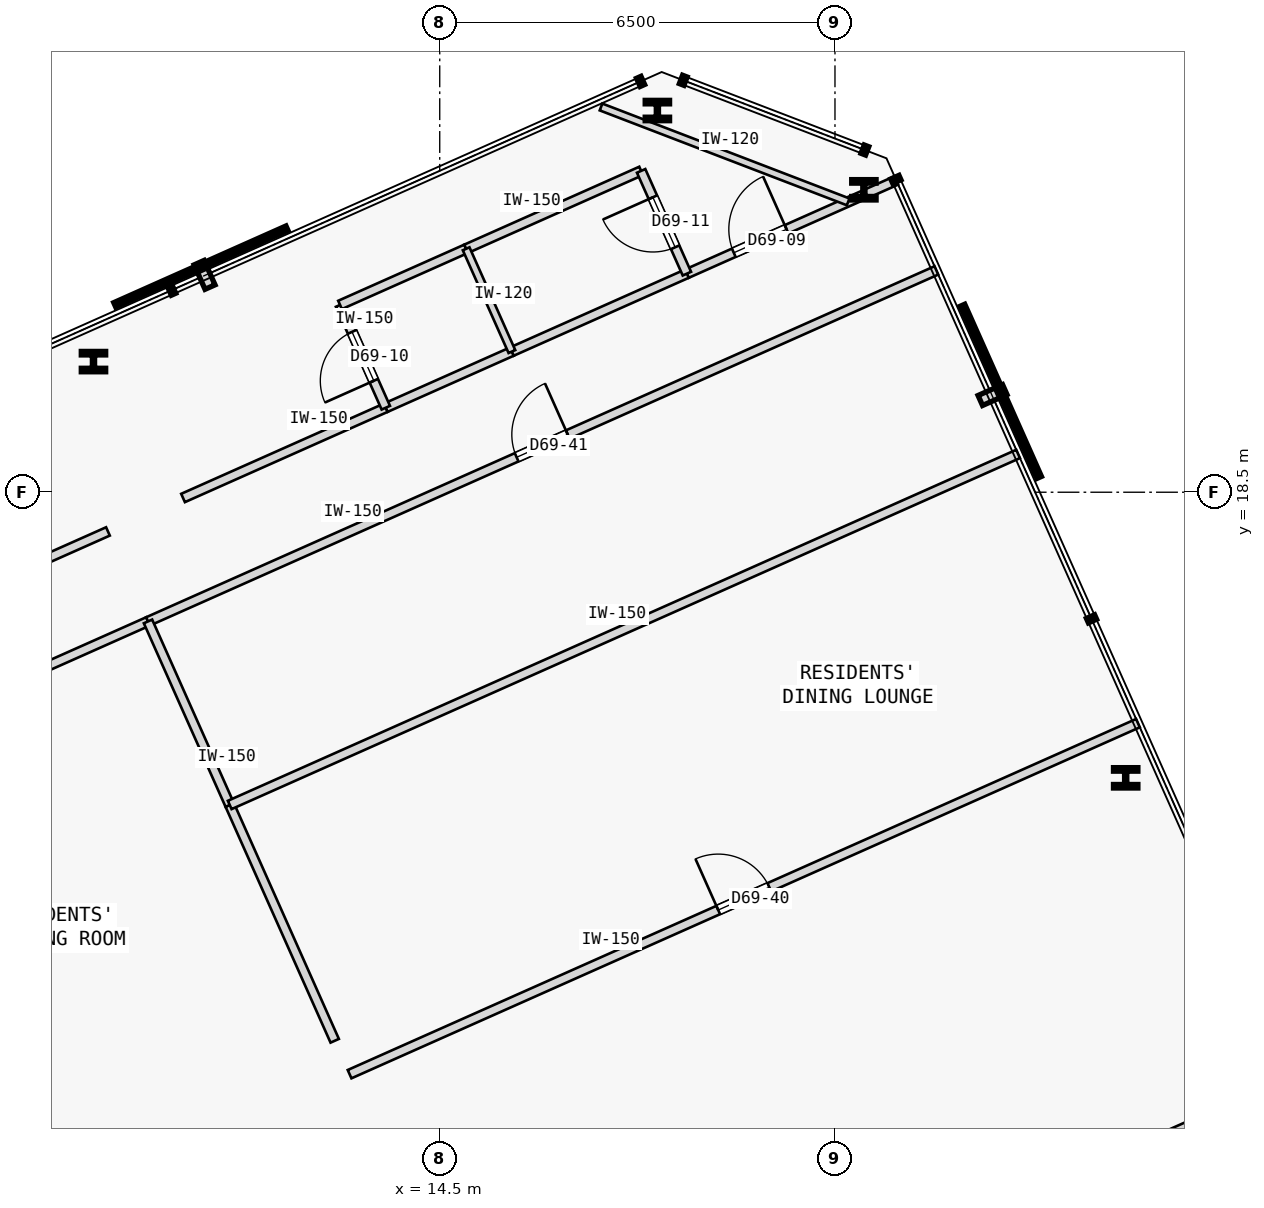
"""IFC4 building model, lengths in metres.
Left out: names, types, materials, properties, quantities, classifications, styles, units other than length and angle.
Written with IfcOpenShell. Run it as: python <this file> out.ifc"""

import sys

from ifc_helpers import new_model, si_unit, direction, frame, frame_2d, origin, origin_2d, place, context, subcontext, project, spatial, rectangle, i_section, extrude, element, fill, save


model = new_model("IFC4")
c1 = context("Model", 3, precision=1e-05, world=origin(), true_north=direction((0.0, 1.0)))
c2 = subcontext(c1, "Body", "Model", "MODEL_VIEW")
j1 = project(units=[si_unit("LENGTHUNIT", "METRE"), si_unit("PLANEANGLEUNIT", "RADIAN")], contexts=[c1])
p1 = place(None, origin())
s1 = spatial("IfcSite", under=j1, at=p1, CompositionType="ELEMENT")
p2 = place(p1, origin())
s2 = spatial("IfcBuilding", under=s1, at=p2, CompositionType="ELEMENT")
p3 = place(p2, frame((0.0, 0.0, 258.85)))
s3 = spatial("IfcBuildingStorey", under=s2, at=p3, CompositionType="ELEMENT", Elevation=258.85)
for number, where, z_axis, x_axis in (
    (1, (25.781, 13.803, 0.0), (0.0, 0.0, 1.0), (1.0, 0.0, 0.0)),
    (2, (21.476, 23.473, 0.0), (0.0, 0.0, 1.0), (1.0, 0.0, 0.0)),
    (3, (18.08, 24.777, 0.0), (0.0, 0.0, 1.0), (1.0, 0.0, 0.0)),
    (4, (8.806, 20.648, 0.0), (0.0, 0.0, 1.0), (1.0, 0.0, 0.0)),
):
    element("IfcColumn", number, at=place(p3, frame(where, z_axis=z_axis, x_axis=x_axis)), inside=s3, PredefinedType="COLUMN", context=c2, shape_type="SweptSolid", body=[
        extrude(i_section(OverallWidth=0.401, OverallDepth=0.335, WebThickness=0.036, FlangeThickness=0.058, FilletRadius=0.015, at=origin_2d()), origin(), (0.0, 0.0, 1.0), 3.35),
    ])
p4 = place(p3, frame((10.279, 18.405, 0.0), z_axis=(0.0, 0.0, 1.0), x_axis=(0.913543802, 0.40674036169, 0.0)))
e5 = element("IfcWall", 5, at=p4, inside=s3, PredefinedType="PARTITIONING", context=c2, shape_type="SweptSolid", body=[
    extrude(rectangle(XDim=3.65, YDim=0.15, at=frame_2d((1.825, 0.0))), origin(), (0.0, 0.0, 1.0), 3.125),
])
p5 = place(p3, frame((18.565, 22.094, 0.0), z_axis=(0.0, 0.0, 1.0), x_axis=(0.913565694971, 0.406691186249, 0.0)))
e6 = element("IfcWall", 6, at=p5, inside=s3, PredefinedType="PARTITIONING", context=c2, shape_type="SweptSolid", body=[
    extrude(rectangle(XDim=3.77, YDim=0.15, at=frame_2d((1.885, 0.0))), origin(), (0.0, 0.0, 1.0), 3.125),
])
p6 = place(p5, frame((0.844, 0.0, 0.0)))
e7 = element("IfcOpeningElement", 7, at=p6, cuts=e6, PredefinedType="OPENING", context=c2, shape_type="SweptSolid", body=[
    extrude(rectangle(XDim=0.95, YDim=2.15, at=frame_2d((0.475, 1.075))), frame((0.0, 0.085, 0.0), z_axis=(0.0, -1.0, 0.0), x_axis=(1.0, 0.0, 0.0)), (0.0, 0.0, 1.0), 0.17),
])
p7 = place(p3, frame((13.613, 19.89, 0.0), z_axis=(0.0, 0.0, 1.0), x_axis=(0.913536363976, 0.406757067172, 0.0)))
e8 = element("IfcWall", 8, at=p7, inside=s3, PredefinedType="PARTITIONING", context=c2, shape_type="SweptSolid", body=[
    extrude(rectangle(XDim=2.27, YDim=0.15, at=frame_2d((1.135, 0.0))), origin(), (0.0, 0.0, 1.0), 3.125),
])
p8 = place(p3, frame((15.687, 20.813, 0.0), z_axis=(0.0, 0.0, 1.0), x_axis=(0.913542880558, 0.406742431252, 0.0)))
e9 = element("IfcWall", 9, at=p8, inside=s3, PredefinedType="PARTITIONING", context=c2, shape_type="SweptSolid", body=[
    extrude(rectangle(XDim=3.15, YDim=0.15, at=frame_2d((1.575, 0.0))), origin(), (0.0, 0.0, 1.0), 3.125),
])
p9 = place(p3, frame((3.7, 13.703, 0.0), z_axis=(0.0, 0.0, 1.0), x_axis=(0.913549363376, 0.406727870542, 0.0)))
e10 = element("IfcWall", 10, at=p9, inside=s3, PredefinedType="PARTITIONING", context=c2, shape_type="SweptSolid", body=[
    extrude(rectangle(XDim=6.571, YDim=0.15, at=frame_2d((3.286, 0.0))), origin(), (0.0, 0.0, 1.0), 3.125),
])
p10 = place(p3, frame((-9.109, 9.773, 0.0), z_axis=(0.0, 0.0, 1.0), x_axis=(0.913545361298, 0.406736859469, 0.0)))
e11 = element("IfcWall", 11, at=p10, inside=s3, PredefinedType="PARTITIONING", context=c2, shape_type="SweptSolid", body=[
    extrude(rectangle(XDim=19.871, YDim=0.15, at=frame_2d((9.936, 0.0))), origin(), (0.0, 0.0, 1.0), 3.125),
])
p11 = place(p10, frame((9.476, 0.0, 0.0)))
e12 = element("IfcOpeningElement", 12, at=p11, cuts=e11, PredefinedType="OPENING", context=c2, shape_type="SweptSolid", body=[
    extrude(rectangle(XDim=0.92, YDim=2.15, at=frame_2d((0.46, 1.075))), frame((0.0, 0.085, 0.0), z_axis=(0.0, -1.0, 0.0), x_axis=(1.0, 0.0, 0.0)), (0.0, 0.0, 1.0), 0.17),
])
p12 = place(p3, frame((9.703, 16.375, 0.0), z_axis=(0.0, 0.0, 1.0), x_axis=(0.913544622417, 0.406738519018, 0.0)))
e13 = element("IfcWall", 13, at=p12, inside=s3, PredefinedType="PARTITIONING", context=c2, shape_type="SweptSolid", body=[
    extrude(rectangle(XDim=14.192, YDim=0.15, at=frame_2d((7.096, 0.0))), origin(), (0.0, 0.0, 1.0), 3.125),
])
p13 = place(p12, frame((6.636, 0.0, 0.0)))
e14 = element("IfcOpeningElement", 14, at=p13, cuts=e13, PredefinedType="OPENING", context=c2, shape_type="SweptSolid", body=[
    extrude(rectangle(XDim=0.92, YDim=2.15, at=frame_2d((0.46, 1.075))), frame((0.0, 0.085, 0.0), z_axis=(0.0, -1.0, 0.0), x_axis=(1.0, 0.0, 0.0)), (0.0, 0.0, 1.0), 0.17),
])
p14 = place(p3, frame((13.613, 19.89, 0.0), z_axis=(0.0, 0.0, 1.0), x_axis=(-0.406701600856, 0.913561058639, 0.0)))
e15 = element("IfcWall", 15, at=p14, inside=s3, PredefinedType="PARTITIONING", context=c2, shape_type="SweptSolid", body=[
    extrude(rectangle(XDim=1.85, YDim=0.15, at=frame_2d((0.925, 0.0))), origin(), (0.0, 0.0, 1.0), 3.125),
])
p15 = place(p14, frame((0.485, 0.0, 0.0)))
e16 = element("IfcOpeningElement", 16, at=p15, cuts=e15, PredefinedType="OPENING", context=c2, shape_type="SweptSolid", body=[
    extrude(rectangle(XDim=0.88, YDim=2.15, at=frame_2d((0.44, 1.075))), frame((0.0, 0.085, 0.0), z_axis=(0.0, -1.0, 0.0), x_axis=(1.0, 0.0, 0.0)), (0.0, 0.0, 1.0), 0.17),
])
p16 = place(p3, frame((12.861, 21.58, 0.0), z_axis=(0.0, 0.0, 1.0), x_axis=(0.913536363976, 0.406757067172, 0.0)))
e17 = element("IfcWall", 17, at=p16, inside=s3, PredefinedType="PARTITIONING", context=c2, shape_type="SweptSolid", body=[
    extrude(rectangle(XDim=2.27, YDim=0.15, at=frame_2d((1.135, 0.0))), origin(), (0.0, 0.0, 1.0), 3.125),
])
p17 = place(p3, frame((14.935, 22.503, 0.0), z_axis=(0.0, 0.0, 1.0), x_axis=(0.913571677955, 0.406677746181, 0.0)))
e18 = element("IfcWall", 18, at=p17, inside=s3, PredefinedType="PARTITIONING", context=c2, shape_type="SweptSolid", body=[
    extrude(rectangle(XDim=3.15, YDim=0.15, at=frame_2d((1.575, 0.0))), origin(), (0.0, 0.0, 1.0), 3.125),
])
p18 = place(p3, frame((18.565, 22.094, 0.0), z_axis=(0.0, 0.0, 1.0), x_axis=(-0.406750635596, 0.913539227643, 0.0)))
e19 = element("IfcWall", 19, at=p18, inside=s3, PredefinedType="PARTITIONING", context=c2, shape_type="SweptSolid", body=[
    extrude(rectangle(XDim=1.85, YDim=0.15, at=frame_2d((0.925, 0.0))), origin(), (0.0, 0.0, 1.0), 3.125),
])
p19 = place(p18, frame((0.475, 0.0, 0.0)))
e20 = element("IfcOpeningElement", 20, at=p19, cuts=e19, PredefinedType="OPENING", context=c2, shape_type="SweptSolid", body=[
    extrude(rectangle(XDim=0.9, YDim=2.15, at=frame_2d((0.45, 1.075))), frame((0.0, 0.085, 0.0), z_axis=(0.0, -1.0, 0.0), x_axis=(1.0, 0.0, 0.0)), (0.0, 0.0, 1.0), 0.17),
])
p20 = place(p3, frame((15.687, 20.813, 0.0), z_axis=(0.0, 0.0, 1.0), x_axis=(-0.406701600856, 0.913561058639, 0.0)))
e21 = element("IfcWall", 21, at=p20, inside=s3, PredefinedType="PARTITIONING", context=c2, shape_type="SweptSolid", body=[
    extrude(rectangle(XDim=1.85, YDim=0.12, at=frame_2d((0.925, 0.0))), origin(), (0.0, 0.0, 1.0), 3.125),
])
p21 = place(p3, frame((12.773, 9.479, 0.0), z_axis=(0.0, 0.0, 1.0), x_axis=(-0.406762672331, 0.913533868227, 0.0)))
e22 = element("IfcWall", 22, at=p21, inside=s3, PredefinedType="PARTITIONING", context=c2, shape_type="SweptSolid", body=[
    extrude(rectangle(XDim=4.245, YDim=0.15, at=frame_2d((2.123, 0.0))), origin(), (0.0, 0.0, 1.0), 3.125),
])
p22 = place(p3, frame((11.046, 13.357, 0.0), z_axis=(0.0, 0.0, 1.0), x_axis=(-0.406714303965, 0.913555403328, 0.0)))
e23 = element("IfcWall", 23, at=p22, inside=s3, PredefinedType="PARTITIONING", context=c2, shape_type="SweptSolid", body=[
    extrude(rectangle(XDim=3.304, YDim=0.15, at=frame_2d((1.652, 0.0))), origin(), (0.0, 0.0, 1.0), 3.125),
])
p23 = place(p3, frame((15.616, 3.094, 0.0), z_axis=(0.0, 0.0, 1.0), x_axis=(0.913551014388, 0.406724162191, 0.0)))
e24 = element("IfcWall", 24, at=p23, inside=s3, PredefinedType="PARTITIONING", context=c2, shape_type="SweptSolid", body=[
    extrude(rectangle(XDim=14.192, YDim=0.15, at=frame_2d((7.096, 0.0))), origin(), (0.0, 0.0, 1.0), 3.125),
])
p24 = place(p23, frame((6.636, 0.0, 0.0)))
e25 = element("IfcOpeningElement", 25, at=p24, cuts=e24, PredefinedType="OPENING", context=c2, shape_type="SweptSolid", body=[
    extrude(rectangle(XDim=0.92, YDim=2.15, at=frame_2d((0.46, 1.075))), frame((0.0, 0.085, 0.0), z_axis=(0.0, -1.0, 0.0), x_axis=(1.0, 0.0, 0.0)), (0.0, 0.0, 1.0), 0.17),
])
p25 = place(p3, frame((13.018, 8.93, 0.0), z_axis=(0.0, 0.0, 1.0), x_axis=(0.913551014388, 0.406724162191, 0.0)))
e26 = element("IfcWall", 26, at=p25, inside=s3, PredefinedType="PARTITIONING", context=c2, shape_type="SweptSolid", body=[
    extrude(rectangle(XDim=14.192, YDim=0.15, at=frame_2d((7.096, 0.0))), origin(), (0.0, 0.0, 1.0), 3.125),
])
p26 = place(p25, frame((6.636, 0.0, 0.0)))
e27 = element("IfcOpeningElement", 27, at=p26, cuts=e26, PredefinedType="OPENING", context=c2, shape_type="SweptSolid", body=[
    extrude(rectangle(XDim=0.92, YDim=2.15, at=frame_2d((0.46, 1.075))), frame((0.0, 0.085, 0.0), z_axis=(0.0, -1.0, 0.0), x_axis=(1.0, 0.0, 0.0)), (0.0, 0.0, 1.0), 0.17),
])
p27 = place(p3, frame((11.046, 13.357, 0.0), z_axis=(0.0, 0.0, 1.0), x_axis=(0.913553860075, 0.406717770379, 0.0)))
e28 = element("IfcWall", 28, at=p27, inside=s3, PredefinedType="PARTITIONING", context=c2, shape_type="SweptSolid", body=[
    extrude(rectangle(XDim=14.192, YDim=0.15, at=frame_2d((7.096, 0.0))), origin(), (0.0, 0.0, 1.0), 3.125),
])
p28 = place(p3, frame((17.153, 24.835, 0.0), z_axis=(0.0, 0.0, 1.0), x_axis=(0.933583889907, -0.358358926924, 0.0)))
e29 = element("IfcWall", 29, at=p28, inside=s3, PredefinedType="PARTITIONING", context=c2, shape_type="SweptSolid", body=[
    extrude(rectangle(XDim=4.353, YDim=0.12, at=frame_2d((2.177, 0.0))), origin(), (0.0, 0.0, 1.0), 3.125),
])
p29 = place(p6, origin())
e30 = element("IfcDoor", 30, at=p29, inside=s3, OperationType="SINGLE_SWING_RIGHT", PredefinedType="DOOR", context=c2, shape_type="SweptSolid", body=[
    extrude(rectangle(XDim=0.95, YDim=2.15, at=frame_2d((0.475, 1.075))), frame((0.0, 0.025, 0.0), z_axis=(0.0, -1.0, 0.0), x_axis=(1.0, 0.0, 0.0)), (0.0, 0.0, 1.0), 0.05),
])
fill(e7, e30)
p30 = place(p15, origin())
e31 = element("IfcDoor", 31, at=p30, inside=s3, OperationType="SINGLE_SWING_LEFT", PredefinedType="DOOR", context=c2, shape_type="SweptSolid", body=[
    extrude(rectangle(XDim=0.88, YDim=2.15, at=frame_2d((0.44, 1.075))), frame((0.0, 0.025, 0.0), z_axis=(0.0, -1.0, 0.0), x_axis=(1.0, 0.0, 0.0)), (0.0, 0.0, 1.0), 0.05),
])
fill(e16, e31)
p31 = place(p19, origin())
e32 = element("IfcDoor", 32, at=p31, inside=s3, OperationType="SINGLE_SWING_RIGHT", PredefinedType="DOOR", context=c2, shape_type="SweptSolid", body=[
    extrude(rectangle(XDim=0.9, YDim=2.15, at=frame_2d((0.45, 1.075))), frame((0.0, 0.025, 0.0), z_axis=(0.0, -1.0, 0.0), x_axis=(1.0, 0.0, 0.0)), (0.0, 0.0, 1.0), 0.05),
])
fill(e20, e32)
p32 = place(p26, origin())
e33 = element("IfcDoor", 33, at=p32, inside=s3, OperationType="SINGLE_SWING_LEFT", PredefinedType="DOOR", context=c2, shape_type="SweptSolid", body=[
    extrude(rectangle(XDim=0.92, YDim=2.15, at=frame_2d((0.46, 1.075))), frame((0.0, 0.025, 0.0), z_axis=(0.0, -1.0, 0.0), x_axis=(1.0, 0.0, 0.0)), (0.0, 0.0, 1.0), 0.05),
])
fill(e27, e33)
p33 = place(p13, origin())
e34 = element("IfcDoor", 34, at=p33, inside=s3, OperationType="SINGLE_SWING_RIGHT", PredefinedType="DOOR", context=c2, shape_type="SweptSolid", body=[
    extrude(rectangle(XDim=0.92, YDim=2.15, at=frame_2d((0.46, 1.075))), frame((0.0, 0.025, 0.0), z_axis=(0.0, -1.0, 0.0), x_axis=(1.0, 0.0, 0.0)), (0.0, 0.0, 1.0), 0.05),
])
fill(e14, e34)
save(model, sys.argv[1])
